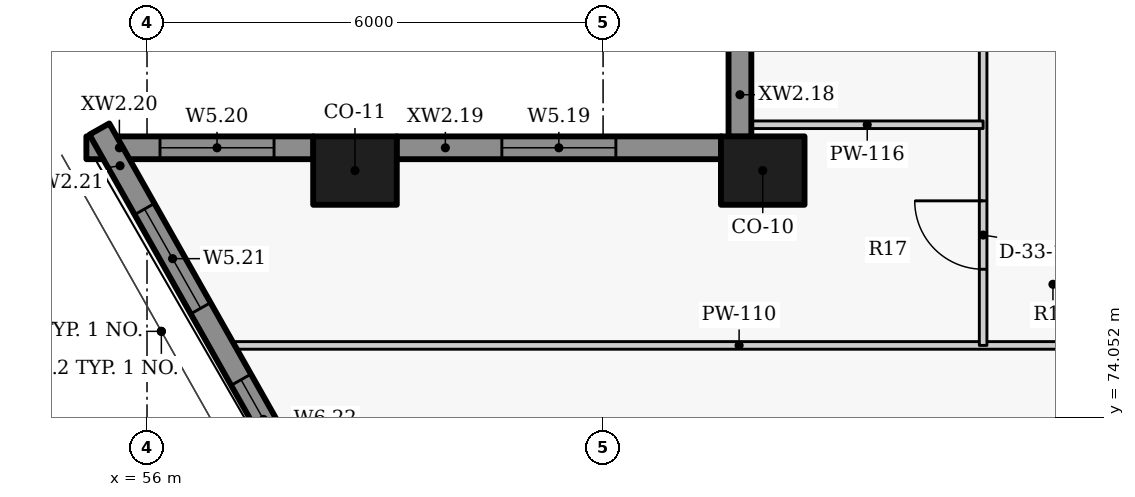
"""IFC4 building model, lengths in metres.
Left out: names, types, materials, properties, quantities, classifications, styles, units other than length and angle.
Written with IfcOpenShell. Run it as: python <this file> out.ifc"""

import sys

from ifc_helpers import new_model, si_unit, direction, frame, frame_2d, origin, origin_2d, place, context, subcontext, project, spatial, rectangle, extrude, element, fill, save


model = new_model("IFC4")
c1 = context("Model", 3, precision=1e-05, world=origin(), true_north=direction((0.0, 1.0)))
c2 = subcontext(c1, "Body", "Model", "MODEL_VIEW")
j1 = project(units=[si_unit("LENGTHUNIT", "METRE"), si_unit("PLANEANGLEUNIT", "RADIAN")], contexts=[c1])
p1 = place(None, origin())
s1 = spatial("IfcSite", under=j1, at=p1, CompositionType="ELEMENT")
p2 = place(p1, origin())
s2 = spatial("IfcBuilding", under=s1, at=p2, CompositionType="ELEMENT")
p3 = place(p2, frame((0.0, 0.0, 269.1)))
s3 = spatial("IfcBuildingStorey", under=s2, at=p3, CompositionType="ELEMENT", Elevation=269.1)
for number, where, z_axis, x_axis in (
    (1, (64.101, 77.3, 0.0), (0.0, 0.0, 1.0), (-1.0, 0.0, 0.0)),
    (2, (58.736, 77.3, 0.0), (0.0, 0.0, 1.0), (-1.0, 0.0, 0.0)),
):
    element("IfcColumn", number, at=place(p3, frame(where, z_axis=z_axis, x_axis=x_axis)), inside=s3, PredefinedType="COLUMN", context=c2, shape_type="SweptSolid", body=[
        extrude(rectangle(XDim=1.1, YDim=0.9, at=origin_2d()), origin(), (0.0, 0.0, 1.0), 3.3),
    ])
p4 = place(p3, frame((63.801, 82.154, 0.0), z_axis=(0.0, 0.0, 1.0), x_axis=(0.0, -1.0, 0.0)))
e3 = element("IfcWall", 3, at=p4, inside=s3, PredefinedType="SOLIDWALL", context=c2, shape_type="SweptSolid", body=[
    extrude(rectangle(XDim=4.408, YDim=0.3, at=frame_2d((2.204, 0.0))), origin(), (0.0, 0.0, 1.0), 2.125),
])
p5 = place(p4, frame((1.104, 0.0, 0.9)))
e4 = element("IfcOpeningElement", 4, at=p5, cuts=e3, PredefinedType="OPENING", context=c2, shape_type="SweptSolid", body=[
    extrude(rectangle(XDim=2.1, YDim=1.1, at=frame_2d((1.05, 0.55))), frame((0.0, 0.16, 0.0), z_axis=(0.0, -1.0, 0.0), x_axis=(1.0, 0.0, 0.0)), (0.0, 0.0, 1.0), 0.32),
])
p6 = place(p3, frame((63.554, 77.6, 0.0), z_axis=(0.0, 0.0, 1.0), x_axis=(-1.0, 0.0, 0.0)))
e5 = element("IfcWall", 5, at=p6, inside=s3, PredefinedType="SOLIDWALL", context=c2, shape_type="SweptSolid", body=[
    extrude(rectangle(XDim=4.272, YDim=0.3, at=frame_2d((2.136, 0.0))), origin(), (0.0, 0.0, 1.0), 2.125),
])
p7 = place(p6, frame((1.386, 0.0, 0.9)))
e6 = element("IfcOpeningElement", 6, at=p7, cuts=e5, PredefinedType="OPENING", context=c2, shape_type="SweptSolid", body=[
    extrude(rectangle(XDim=1.5, YDim=1.1, at=frame_2d((0.75, 0.55))), frame((0.0, 0.16, 0.0), z_axis=(0.0, -1.0, 0.0), x_axis=(1.0, 0.0, 0.0)), (0.0, 0.0, 1.0), 0.32),
])
p8 = place(p3, frame((58.19, 77.6, 0.0), z_axis=(0.0, 0.0, 1.0), x_axis=(-1.0, 0.0, 0.0)))
e7 = element("IfcWall", 7, at=p8, inside=s3, PredefinedType="SOLIDWALL", context=c2, shape_type="SweptSolid", body=[
    extrude(rectangle(XDim=2.988, YDim=0.3, at=frame_2d((1.494, 0.0))), origin(), (0.0, 0.0, 1.0), 2.125),
])
p9 = place(p8, frame((0.519, 0.0, 0.9)))
e8 = element("IfcOpeningElement", 8, at=p9, cuts=e7, PredefinedType="OPENING", context=c2, shape_type="SweptSolid", body=[
    extrude(rectangle(XDim=1.5, YDim=1.1, at=frame_2d((0.75, 0.55))), frame((0.0, 0.16, 0.0), z_axis=(0.0, -1.0, 0.0), x_axis=(1.0, 0.0, 0.0)), (0.0, 0.0, 1.0), 0.32),
])
p10 = place(p3, frame((55.373, 77.846, 0.0), z_axis=(0.0, 0.0, 1.0), x_axis=(0.492080931903, -0.870549456641, 0.0)))
e9 = element("IfcWall", 9, at=p10, inside=s3, PredefinedType="SOLIDWALL", context=c2, shape_type="SweptSolid", body=[
    extrude(rectangle(XDim=5.437, YDim=0.3, at=frame_2d((2.718, 0.0))), origin(), (0.0, 0.0, 1.0), 2.125),
])
p11 = place(p10, frame((1.209, 0.0, 0.9)))
e10 = element("IfcOpeningElement", 10, at=p11, cuts=e9, PredefinedType="OPENING", context=c2, shape_type="SweptSolid", body=[
    extrude(rectangle(XDim=1.5, YDim=1.1, at=frame_2d((0.75, 0.55))), frame((0.0, 0.16, 0.0), z_axis=(0.0, -1.0, 0.0), x_axis=(1.0, 0.0, 0.0)), (0.0, 0.0, 1.0), 0.32),
])
p12 = place(p10, frame((3.789, 0.0, 0.9)))
e11 = element("IfcOpeningElement", 11, at=p12, cuts=e9, PredefinedType="OPENING", context=c2, shape_type="SweptSolid", body=[
    extrude(rectangle(XDim=1.2, YDim=1.1, at=frame_2d((0.6, 0.55))), frame((0.0, 0.16, 0.0), z_axis=(0.0, -1.0, 0.0), x_axis=(1.0, 0.0, 0.0)), (0.0, 0.0, 1.0), 0.32),
])
p13 = place(p3, frame((57.079, 75.0, 0.0), z_axis=(0.0, 0.0, 1.0), x_axis=(1.0, 0.0, 0.0)))
e12 = element("IfcWall", 12, at=p13, inside=s3, PredefinedType="PARTITIONING", context=c2, shape_type="SweptSolid", body=[
    extrude(rectangle(XDim=13.421, YDim=0.1, at=frame_2d((6.71, 0.0))), origin(), (0.0, 0.0, 1.0), 2.105),
])
p14 = place(p3, frame((67.0, 75.0, 0.0), z_axis=(0.0, 0.0, 1.0), x_axis=(0.0, 1.0, 0.0)))
e13 = element("IfcWall", 13, at=p14, inside=s3, PredefinedType="PARTITIONING", context=c2, shape_type="SweptSolid", body=[
    extrude(rectangle(XDim=10.0, YDim=0.1, at=frame_2d((5.0, 0.0))), origin(), (0.0, 0.0, 1.0), 3.025),
])
p15 = place(p14, frame((1.002, 0.0, 0.0)))
e14 = element("IfcOpeningElement", 14, at=p15, cuts=e13, PredefinedType="OPENING", context=c2, shape_type="SweptSolid", body=[
    extrude(rectangle(XDim=0.9, YDim=2.1, at=frame_2d((0.45, 1.05))), frame((0.0, 0.06, 0.0), z_axis=(0.0, -1.0, 0.0), x_axis=(1.0, 0.0, 0.0)), (0.0, 0.0, 1.0), 0.12),
])
p16 = place(p14, frame((4.55, 0.0, 0.0)))
e15 = element("IfcOpeningElement", 15, at=p16, cuts=e13, PredefinedType="OPENING", context=c2, shape_type="SweptSolid", body=[
    extrude(rectangle(XDim=0.9, YDim=2.1, at=frame_2d((0.45, 1.05))), frame((0.0, 0.06, 0.0), z_axis=(0.0, -1.0, 0.0), x_axis=(1.0, 0.0, 0.0)), (0.0, 0.0, 1.0), 0.12),
])
p17 = place(p14, frame((8.098, 0.0, 0.0)))
e16 = element("IfcOpeningElement", 16, at=p17, cuts=e13, PredefinedType="OPENING", context=c2, shape_type="SweptSolid", body=[
    extrude(rectangle(XDim=0.9, YDim=2.1, at=frame_2d((0.45, 1.05))), frame((0.0, 0.06, 0.0), z_axis=(0.0, -1.0, 0.0), x_axis=(1.0, 0.0, 0.0)), (0.0, 0.0, 1.0), 0.12),
])
p18 = place(p3, frame((63.95, 77.903, 0.0), z_axis=(0.0, 0.0, 1.0), x_axis=(1.0, 0.0, 0.0)))
e17 = element("IfcWall", 17, at=p18, inside=s3, PredefinedType="PARTITIONING", context=c2, shape_type="SweptSolid", body=[
    extrude(rectangle(XDim=3.05, YDim=0.1, at=frame_2d((1.525, 0.0))), origin(), (0.0, 0.0, 1.0), 2.105),
])
p19 = place(p7, origin())
e18 = element("IfcWindow", 18, at=p19, inside=s3, PartitioningType="SINGLE_PANEL", PredefinedType="WINDOW", context=c2, shape_type="SweptSolid", body=[
    extrude(rectangle(XDim=1.5, YDim=1.1, at=frame_2d((0.75, 0.55))), frame((0.0, 0.03, 0.0), z_axis=(0.0, -1.0, 0.0), x_axis=(1.0, 0.0, 0.0)), (0.0, 0.0, 1.0), 0.06),
])
fill(e6, e18)
p20 = place(p9, origin())
e19 = element("IfcWindow", 19, at=p20, inside=s3, PartitioningType="SINGLE_PANEL", PredefinedType="WINDOW", context=c2, shape_type="SweptSolid", body=[
    extrude(rectangle(XDim=1.5, YDim=1.1, at=frame_2d((0.75, 0.55))), frame((0.0, 0.03, 0.0), z_axis=(0.0, -1.0, 0.0), x_axis=(1.0, 0.0, 0.0)), (0.0, 0.0, 1.0), 0.06),
])
fill(e8, e19)
p21 = place(p11, origin())
e20 = element("IfcWindow", 20, at=p21, inside=s3, PartitioningType="SINGLE_PANEL", PredefinedType="WINDOW", context=c2, shape_type="SweptSolid", body=[
    extrude(rectangle(XDim=1.5, YDim=1.1, at=frame_2d((0.75, 0.55))), frame((0.0, 0.03, 0.0), z_axis=(0.0, -1.0, 0.0), x_axis=(1.0, 0.0, 0.0)), (0.0, 0.0, 1.0), 0.06),
])
fill(e10, e20)
p22 = place(p12, origin())
e21 = element("IfcWindow", 21, at=p22, inside=s3, PartitioningType="SINGLE_PANEL", PredefinedType="WINDOW", context=c2, shape_type="SweptSolid", body=[
    extrude(rectangle(XDim=1.2, YDim=1.1, at=frame_2d((0.6, 0.55))), frame((0.0, 0.03, 0.0), z_axis=(0.0, -1.0, 0.0), x_axis=(1.0, 0.0, 0.0)), (0.0, 0.0, 1.0), 0.06),
])
fill(e11, e21)
p23 = place(p15, origin())
e22 = element("IfcDoor", 22, at=p23, inside=s3, OperationType="SINGLE_SWING_RIGHT", PredefinedType="DOOR", context=c2, shape_type="SweptSolid", body=[
    extrude(rectangle(XDim=0.9, YDim=2.1, at=frame_2d((0.45, 1.05))), frame((0.0, 0.025, 0.0), z_axis=(0.0, -1.0, 0.0), x_axis=(1.0, 0.0, 0.0)), (0.0, 0.0, 1.0), 0.05),
])
fill(e14, e22)
save(model, sys.argv[1])
